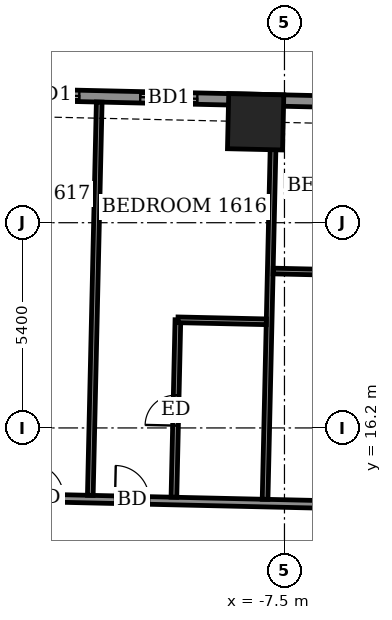
"""IFC4 building model, lengths in metres.
Left out: names, types, materials, properties, quantities, classifications, styles, units other than length and angle.
Written with IfcOpenShell. Run it as: python <this file> out.ifc"""

import sys

from ifc_helpers import new_model, si_unit, direction, frame, frame_2d, origin, origin_2d, place, context, subcontext, project, spatial, rectangle, extrude, element, fill, save


model = new_model("IFC4")
c1 = context("Model", 3, precision=1e-05, world=origin(), true_north=direction((0.0, 1.0)))
c2 = subcontext(c1, "Body", "Model", "MODEL_VIEW")
j1 = project(units=[si_unit("LENGTHUNIT", "METRE"), si_unit("PLANEANGLEUNIT", "RADIAN")], contexts=[c1])
p1 = place(None, origin())
s1 = spatial("IfcSite", under=j1, at=p1, CompositionType="ELEMENT")
p2 = place(p1, origin())
s2 = spatial("IfcBuilding", under=s1, at=p2, CompositionType="ELEMENT")
p3 = place(p2, frame((0.0, 0.0, 67.5)))
s3 = spatial("IfcBuildingStorey", under=s2, at=p3, CompositionType="ELEMENT", Elevation=67.5)
p4 = place(p3, frame((-8.259, 24.255, -0.55), z_axis=(0.0, 0.0, 1.0), x_axis=(-0.9997425919, 0.02268810132, 0.0)))
e1 = element("IfcColumn", 1, at=p4, inside=s3, PredefinedType="COLUMN", context=c2, shape_type="SweptSolid", body=[
    extrude(rectangle(XDim=1.45, YDim=1.45, at=origin_2d()), origin(), (0.0, 0.0, 1.0), 3.6),
])
p5 = place(p3, frame((27.407, 24.021, 0.0), z_axis=(0.0, 0.0, 1.0), x_axis=(-0.99974239923, 0.022696589664, 0.0)))
e2 = element("IfcWall", 2, at=p5, inside=s3, PredefinedType="SOLIDWALL", context=c2, shape_type="SweptSolid", body=[
    extrude(rectangle(XDim=49.836, YDim=0.3, at=frame_2d((24.918, 0.0))), origin(), (0.0, 0.0, 1.0), 3.05),
])
p6 = place(p5, frame((2.998, 0.0, 0.0)))
e3 = element("IfcOpeningElement", 3, at=p6, cuts=e2, PredefinedType="OPENING", context=c2, shape_type="SweptSolid", body=[
    extrude(rectangle(XDim=1.5, YDim=2.4, at=frame_2d((0.75, 1.2))), frame((0.0, 0.16, 0.0), z_axis=(0.0, -1.0, 0.0), x_axis=(1.0, 0.0, 0.0)), (0.0, 0.0, 1.0), 0.32),
])
p7 = place(p5, frame((9.086, 0.0, 0.0)))
e4 = element("IfcOpeningElement", 4, at=p7, cuts=e2, PredefinedType="OPENING", context=c2, shape_type="SweptSolid", body=[
    extrude(rectangle(XDim=1.5, YDim=2.4, at=frame_2d((0.75, 1.2))), frame((0.0, 0.16, 0.0), z_axis=(0.0, -1.0, 0.0), x_axis=(1.0, 0.0, 0.0)), (0.0, 0.0, 1.0), 0.32),
])
p8 = place(p5, frame((15.017, 0.0, 0.0)))
e5 = element("IfcOpeningElement", 5, at=p8, cuts=e2, PredefinedType="OPENING", context=c2, shape_type="SweptSolid", body=[
    extrude(rectangle(XDim=1.5, YDim=2.4, at=frame_2d((0.75, 1.2))), frame((0.0, 0.16, 0.0), z_axis=(0.0, -1.0, 0.0), x_axis=(1.0, 0.0, 0.0)), (0.0, 0.0, 1.0), 0.32),
])
p9 = place(p5, frame((18.124, 0.0, 0.0)))
e6 = element("IfcOpeningElement", 6, at=p9, cuts=e2, PredefinedType="OPENING", context=c2, shape_type="SweptSolid", body=[
    extrude(rectangle(XDim=1.5, YDim=2.4, at=frame_2d((0.75, 1.2))), frame((0.0, 0.16, 0.0), z_axis=(0.0, -1.0, 0.0), x_axis=(1.0, 0.0, 0.0)), (0.0, 0.0, 1.0), 0.32),
])
p10 = place(p5, frame((23.149, 0.0, 0.0)))
e7 = element("IfcOpeningElement", 7, at=p10, cuts=e2, PredefinedType="OPENING", context=c2, shape_type="SweptSolid", body=[
    extrude(rectangle(XDim=1.5, YDim=2.4, at=frame_2d((0.75, 1.2))), frame((0.0, 0.16, 0.0), z_axis=(0.0, -1.0, 0.0), x_axis=(1.0, 0.0, 0.0)), (0.0, 0.0, 1.0), 0.32),
])
p11 = place(p5, frame((26.405, 0.0, 0.0)))
e8 = element("IfcOpeningElement", 8, at=p11, cuts=e2, PredefinedType="OPENING", context=c2, shape_type="SweptSolid", body=[
    extrude(rectangle(XDim=1.2, YDim=2.4, at=frame_2d((0.6, 1.2))), frame((0.0, 0.16, 0.0), z_axis=(0.0, -1.0, 0.0), x_axis=(1.0, 0.0, 0.0)), (0.0, 0.0, 1.0), 0.32),
])
p12 = place(p5, frame((31.986, 0.0, 0.0)))
e9 = element("IfcOpeningElement", 9, at=p12, cuts=e2, PredefinedType="OPENING", context=c2, shape_type="SweptSolid", body=[
    extrude(rectangle(XDim=1.5, YDim=2.4, at=frame_2d((0.75, 1.2))), frame((0.0, 0.16, 0.0), z_axis=(0.0, -1.0, 0.0), x_axis=(1.0, 0.0, 0.0)), (0.0, 0.0, 1.0), 0.32),
])
p13 = place(p5, frame((37.211, 0.0, 0.0)))
e10 = element("IfcOpeningElement", 10, at=p13, cuts=e2, PredefinedType="OPENING", context=c2, shape_type="SweptSolid", body=[
    extrude(rectangle(XDim=1.5, YDim=2.4, at=frame_2d((0.75, 1.2))), frame((0.0, 0.16, 0.0), z_axis=(0.0, -1.0, 0.0), x_axis=(1.0, 0.0, 0.0)), (0.0, 0.0, 1.0), 0.32),
])
p14 = place(p5, frame((40.317, 0.0, 0.0)))
e11 = element("IfcOpeningElement", 11, at=p14, cuts=e2, PredefinedType="OPENING", context=c2, shape_type="SweptSolid", body=[
    extrude(rectangle(XDim=1.5, YDim=2.4, at=frame_2d((0.75, 1.2))), frame((0.0, 0.16, 0.0), z_axis=(0.0, -1.0, 0.0), x_axis=(1.0, 0.0, 0.0)), (0.0, 0.0, 1.0), 0.32),
])
p15 = place(p5, frame((45.431, 0.0, 0.9)))
e12 = element("IfcOpeningElement", 12, at=p15, cuts=e2, PredefinedType="OPENING", context=c2, shape_type="SweptSolid", body=[
    extrude(rectangle(XDim=2.4, YDim=1.5, at=frame_2d((1.2, 0.75))), frame((0.0, 0.16, 0.0), z_axis=(0.0, -1.0, 0.0), x_axis=(1.0, 0.0, 0.0)), (0.0, 0.0, 1.0), 0.32),
])
p16 = place(p3, frame((-25.481, 14.619, 0.0), z_axis=(0.0, 0.0, 1.0), x_axis=(0.999742349682, -0.022698772048, 0.0)))
e13 = element("IfcWall", 13, at=p16, inside=s3, PredefinedType="PARTITIONING", context=c2, shape_type="SweptSolid", body=[
    extrude(rectangle(XDim=54.886, YDim=0.2, at=frame_2d((27.443, 0.0))), origin(), (0.0, 0.0, 1.0), 3.05),
])
p17 = place(p16, frame((52.093, 0.0, 0.0)))
e14 = element("IfcOpeningElement", 14, at=p17, cuts=e13, PredefinedType="OPENING", context=c2, shape_type="SweptSolid", body=[
    extrude(rectangle(XDim=1.0, YDim=2.1, at=frame_2d((0.5, 1.05))), frame((0.0, 0.11, 0.0), z_axis=(0.0, -1.0, 0.0), x_axis=(1.0, 0.0, 0.0)), (0.0, 0.0, 1.0), 0.22),
])
p18 = place(p16, frame((46.325, 0.0, 0.0)))
e15 = element("IfcOpeningElement", 15, at=p18, cuts=e13, PredefinedType="OPENING", context=c2, shape_type="SweptSolid", body=[
    extrude(rectangle(XDim=0.9, YDim=2.1, at=frame_2d((0.45, 1.05))), frame((0.0, 0.11, 0.0), z_axis=(0.0, -1.0, 0.0), x_axis=(1.0, 0.0, 0.0)), (0.0, 0.0, 1.0), 0.22),
])
p19 = place(p16, frame((41.275, 0.0, 0.0)))
e16 = element("IfcOpeningElement", 16, at=p19, cuts=e13, PredefinedType="OPENING", context=c2, shape_type="SweptSolid", body=[
    extrude(rectangle(XDim=0.9, YDim=2.1, at=frame_2d((0.45, 1.05))), frame((0.0, 0.11, 0.0), z_axis=(0.0, -1.0, 0.0), x_axis=(1.0, 0.0, 0.0)), (0.0, 0.0, 1.0), 0.22),
])
p20 = place(p16, frame((38.875, 0.0, 0.0)))
e17 = element("IfcOpeningElement", 17, at=p20, cuts=e13, PredefinedType="OPENING", context=c2, shape_type="SweptSolid", body=[
    extrude(rectangle(XDim=0.9, YDim=2.1, at=frame_2d((0.45, 1.05))), frame((0.0, 0.11, 0.0), z_axis=(0.0, -1.0, 0.0), x_axis=(1.0, 0.0, 0.0)), (0.0, 0.0, 1.0), 0.22),
])
p21 = place(p16, frame((31.95, 0.0, 0.0)))
e18 = element("IfcOpeningElement", 18, at=p21, cuts=e13, PredefinedType="OPENING", context=c2, shape_type="SweptSolid", body=[
    extrude(rectangle(XDim=0.9, YDim=2.1, at=frame_2d((0.45, 1.05))), frame((0.0, 0.11, 0.0), z_axis=(0.0, -1.0, 0.0), x_axis=(1.0, 0.0, 0.0)), (0.0, 0.0, 1.0), 0.22),
])
p22 = place(p16, frame((29.8, 0.0, 0.0)))
e19 = element("IfcOpeningElement", 19, at=p22, cuts=e13, PredefinedType="OPENING", context=c2, shape_type="SweptSolid", body=[
    extrude(rectangle(XDim=0.9, YDim=2.1, at=frame_2d((0.45, 1.05))), frame((0.0, 0.11, 0.0), z_axis=(0.0, -1.0, 0.0), x_axis=(1.0, 0.0, 0.0)), (0.0, 0.0, 1.0), 0.22),
])
p23 = place(p16, frame((22.875, 0.0, 0.0)))
e20 = element("IfcOpeningElement", 20, at=p23, cuts=e13, PredefinedType="OPENING", context=c2, shape_type="SweptSolid", body=[
    extrude(rectangle(XDim=0.9, YDim=2.1, at=frame_2d((0.45, 1.05))), frame((0.0, 0.11, 0.0), z_axis=(0.0, -1.0, 0.0), x_axis=(1.0, 0.0, 0.0)), (0.0, 0.0, 1.0), 0.22),
])
p24 = place(p16, frame((20.675, 0.0, 0.0)))
e21 = element("IfcOpeningElement", 21, at=p24, cuts=e13, PredefinedType="OPENING", context=c2, shape_type="SweptSolid", body=[
    extrude(rectangle(XDim=0.9, YDim=2.1, at=frame_2d((0.45, 1.05))), frame((0.0, 0.11, 0.0), z_axis=(0.0, -1.0, 0.0), x_axis=(1.0, 0.0, 0.0)), (0.0, 0.0, 1.0), 0.22),
])
p25 = place(p16, frame((13.525, 0.0, 0.0)))
e22 = element("IfcOpeningElement", 22, at=p25, cuts=e13, PredefinedType="OPENING", context=c2, shape_type="SweptSolid", body=[
    extrude(rectangle(XDim=0.9, YDim=2.1, at=frame_2d((0.45, 1.05))), frame((0.0, 0.11, 0.0), z_axis=(0.0, -1.0, 0.0), x_axis=(1.0, 0.0, 0.0)), (0.0, 0.0, 1.0), 0.22),
])
p26 = place(p16, frame((11.275, 0.0, 0.0)))
e23 = element("IfcOpeningElement", 23, at=p26, cuts=e13, PredefinedType="OPENING", context=c2, shape_type="SweptSolid", body=[
    extrude(rectangle(XDim=0.9, YDim=2.1, at=frame_2d((0.45, 1.05))), frame((0.0, 0.11, 0.0), z_axis=(0.0, -1.0, 0.0), x_axis=(1.0, 0.0, 0.0)), (0.0, 0.0, 1.0), 0.22),
])
p27 = place(p16, frame((3.079, 0.0, 0.0)))
e24 = element("IfcOpeningElement", 24, at=p27, cuts=e13, PredefinedType="OPENING", context=c2, shape_type="SweptSolid", body=[
    extrude(rectangle(XDim=1.0, YDim=2.1, at=frame_2d((0.5, 1.05))), frame((0.0, 0.11, 0.0), z_axis=(0.0, -1.0, 0.0), x_axis=(1.0, 0.0, 0.0)), (0.0, 0.0, 1.0), 0.22),
])
p28 = place(p3, frame((-12.609, 14.427, 0.0), z_axis=(0.0, 0.0, 1.0), x_axis=(0.022693005506, 0.999742480592, 0.0)))
e25 = element("IfcWall", 25, at=p28, inside=s3, PredefinedType="PARTITIONING", context=c2, shape_type="SweptSolid", body=[
    extrude(rectangle(XDim=10.35, YDim=0.15, at=frame_2d((5.175, 0.0))), origin(), (0.0, 0.0, 1.0), 2.55),
])
p29 = place(p3, frame((-10.409, 14.377, 0.0), z_axis=(0.0, 0.0, 1.0), x_axis=(0.022483854533, 0.99974720619, 0.0)))
e26 = element("IfcWall", 26, at=p29, inside=s3, PredefinedType="PARTITIONING", context=c2, shape_type="SweptSolid", body=[
    extrude(rectangle(XDim=4.669, YDim=0.15, at=frame_2d((2.334, 0.0))), origin(), (0.0, 0.0, 1.0), 3.05),
])
p30 = place(p29, frame((1.885, 0.0, 0.0)))
e27 = element("IfcOpeningElement", 27, at=p30, cuts=e26, PredefinedType="OPENING", context=c2, shape_type="SweptSolid", body=[
    extrude(rectangle(XDim=0.8, YDim=2.1, at=frame_2d((0.4, 1.05))), frame((0.0, 0.085, 0.0), z_axis=(0.0, -1.0, 0.0), x_axis=(1.0, 0.0, 0.0)), (0.0, 0.0, 1.0), 0.17),
])
p31 = place(p3, frame((-8.01, 14.322, 0.0), z_axis=(0.0, 0.0, 1.0), x_axis=(0.022714440015, 0.999741993824, 0.0)))
e28 = element("IfcWall", 28, at=p31, inside=s3, PredefinedType="PARTITIONING", context=c2, shape_type="SweptSolid", body=[
    extrude(rectangle(XDim=10.351, YDim=0.15, at=frame_2d((5.175, 0.0))), origin(), (0.0, 0.0, 1.0), 3.05),
])
p32 = place(p3, frame((-10.302, 19.045, 0.0), z_axis=(0.0, 0.0, 1.0), x_axis=(0.999749954681, -0.022361308448, 0.0)))
e29 = element("IfcWall", 29, at=p32, inside=s3, PredefinedType="PARTITIONING", context=c2, shape_type="SweptSolid", body=[
    extrude(rectangle(XDim=2.325, YDim=0.15, at=frame_2d((1.163, 0.0))), origin(), (0.0, 0.0, 1.0), 3.05),
])
p33 = place(p3, frame((-7.797, 20.329, 0.0), z_axis=(0.0, 0.0, 1.0), x_axis=(0.999738137323, -0.022883548292, 0.0)))
e30 = element("IfcWall", 30, at=p33, inside=s3, PredefinedType="PARTITIONING", context=c2, shape_type="SweptSolid", body=[
    extrude(rectangle(XDim=2.326, YDim=0.15, at=frame_2d((1.163, 0.0))), origin(), (0.0, 0.0, 1.0), 3.05),
])
p34 = place(p13, origin())
e31 = element("IfcDoor", 31, at=p34, inside=s3, OperationType="SLIDING_TO_LEFT", PredefinedType="DOOR", context=c2, shape_type="SweptSolid", body=[
    extrude(rectangle(XDim=1.5, YDim=2.4, at=frame_2d((0.75, 1.2))), frame((0.0, 0.025, 0.0), z_axis=(0.0, -1.0, 0.0), x_axis=(1.0, 0.0, 0.0)), (0.0, 0.0, 1.0), 0.05),
])
fill(e10, e31)
p35 = place(p14, origin())
e32 = element("IfcDoor", 32, at=p35, inside=s3, OperationType="SLIDING_TO_LEFT", PredefinedType="DOOR", context=c2, shape_type="SweptSolid", body=[
    extrude(rectangle(XDim=1.5, YDim=2.4, at=frame_2d((0.75, 1.2))), frame((0.0, 0.025, 0.0), z_axis=(0.0, -1.0, 0.0), x_axis=(1.0, 0.0, 0.0)), (0.0, 0.0, 1.0), 0.05),
])
fill(e11, e32)
p36 = place(p25, origin())
e33 = element("IfcDoor", 33, at=p36, inside=s3, OperationType="SINGLE_SWING_RIGHT", PredefinedType="DOOR", context=c2, shape_type="SweptSolid", body=[
    extrude(rectangle(XDim=0.9, YDim=2.1, at=frame_2d((0.45, 1.05))), frame((0.0, 0.025, 0.0), z_axis=(0.0, -1.0, 0.0), x_axis=(1.0, 0.0, 0.0)), (0.0, 0.0, 1.0), 0.05),
])
fill(e22, e33)
p37 = place(p30, origin())
e34 = element("IfcDoor", 34, at=p37, inside=s3, OperationType="SINGLE_SWING_RIGHT", PredefinedType="DOOR", context=c2, shape_type="SweptSolid", body=[
    extrude(rectangle(XDim=0.8, YDim=2.1, at=frame_2d((0.4, 1.05))), frame((0.0, 0.025, 0.0), z_axis=(0.0, -1.0, 0.0), x_axis=(1.0, 0.0, 0.0)), (0.0, 0.0, 1.0), 0.05),
])
fill(e27, e34)
p38 = place(p26, origin())
e35 = element("IfcDoor", 35, at=p38, inside=s3, OperationType="SINGLE_SWING_LEFT", PredefinedType="DOOR", context=c2, shape_type="SweptSolid", body=[
    extrude(rectangle(XDim=0.9, YDim=2.1, at=frame_2d((0.45, 1.05))), frame((0.0, 0.025, 0.0), z_axis=(0.0, -1.0, 0.0), x_axis=(1.0, 0.0, 0.0)), (0.0, 0.0, 1.0), 0.05),
])
fill(e23, e35)
save(model, sys.argv[1])
